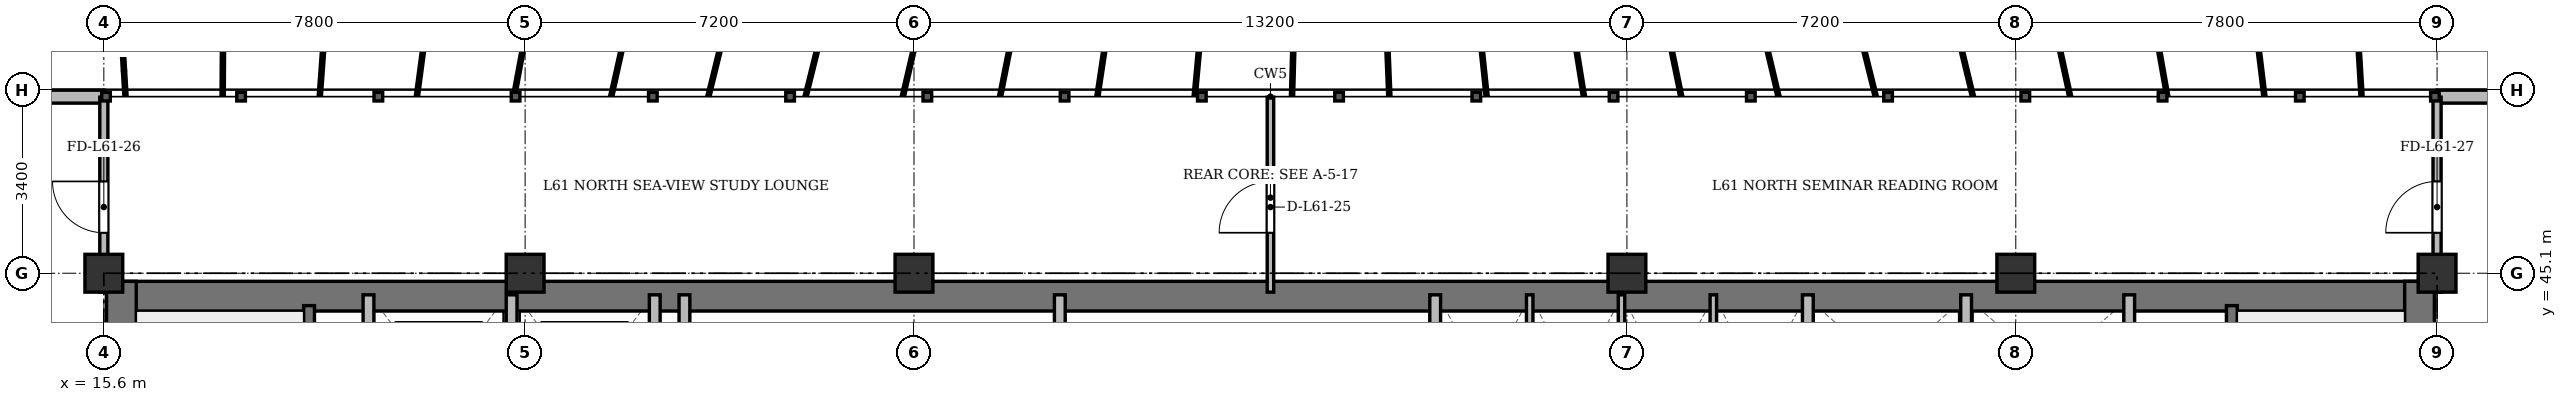
"""IFC4 building model, lengths in metres.
Left out: names, types, materials, properties, quantities, classifications, styles, units other than length and angle.
Written with IfcOpenShell. Run it as: python <this file> out.ifc"""

import sys

from ifc_helpers import new_model, si_unit, direction, frame, frame_2d, origin, origin_2d, place, context, subcontext, project, spatial, rectangle, extrude, source, transform, mapped, element, fill, save


model = new_model("IFC4")
c1 = context("Model", 3, precision=1e-05, world=origin(), true_north=direction((0.0, 1.0)))
c2 = subcontext(c1, "Body", "Model", "MODEL_VIEW")
j1 = project(units=[si_unit("LENGTHUNIT", "METRE"), si_unit("PLANEANGLEUNIT", "RADIAN")], contexts=[c1])
p1 = place(None, origin())
s1 = spatial("IfcSite", under=j1, at=p1, CompositionType="ELEMENT")
p2 = place(p1, origin())
s2 = spatial("IfcBuilding", under=s1, at=p2, CompositionType="ELEMENT")
p3 = place(p2, frame((0.0, 0.0, 233.7)))
s3 = spatial("IfcBuildingStorey", under=s2, at=p3, CompositionType="ELEMENT", Elevation=233.7)
m1 = source(origin(), c2, "Body", "SweptSolid", [
    extrude(rectangle(XDim=0.7, YDim=0.7, at=origin_2d()), origin(), (0.0, 0.0, 1.0), 3.6),
])
for number, where, z_axis, x_axis in (
    (1, (15.6, 45.1, 0.0), (0.0, 0.0, 1.0), (1.0, 0.0, 0.0)),
    (2, (23.4, 45.1, 0.0), (0.0, 0.0, 1.0), (1.0, 0.0, 0.0)),
    (3, (30.6, 45.1, 0.0), (0.0, 0.0, 1.0), (1.0, 0.0, 0.0)),
    (4, (43.8, 45.1, 0.0), (0.0, 0.0, 1.0), (1.0, 0.0, 0.0)),
    (5, (51.0, 45.1, 0.0), (0.0, 0.0, 1.0), (1.0, 0.0, 0.0)),
    (6, (58.8, 45.1, 0.0), (0.0, 0.0, 1.0), (1.0, 0.0, 0.0)),
):
    element("IfcColumn", number, at=place(p3, frame(where, z_axis=z_axis, x_axis=x_axis)), inside=s3, PredefinedType="COLUMN", context=c2, shape_type="MappedRepresentation", body=[
        mapped(m1, transform((0.0, 0.0, 0.0), x_axis=(1.0, 0.0, 0.0), y_axis=(0.0, 1.0, 0.0), z_axis=(0.0, 0.0, 1.0), scale=1.0)),
    ])
p4 = place(p3, frame((11.1, 48.37, 0.0), z_axis=(0.0, 0.0, 1.0), x_axis=(1.0, 0.0, 0.0)))
e7 = element("IfcWall", 7, at=p4, inside=s3, PredefinedType="SOLIDWALL", context=c2, shape_type="SweptSolid", body=[
    extrude(rectangle(XDim=4.5, YDim=0.24, at=frame_2d((2.25, 0.0))), origin(), (0.0, 0.0, 1.0), 3.36),
])
p5 = place(p4, frame((1.667, 0.0, 0.9)))
e8 = element("IfcOpeningElement", 8, at=p5, cuts=e7, PredefinedType="OPENING", context=c2, shape_type="SweptSolid", body=[
    extrude(rectangle(XDim=1.35, YDim=1.5, at=frame_2d((0.675, 0.75))), frame((0.0, 0.13, 0.0), z_axis=(0.0, -1.0, 0.0), x_axis=(1.0, 0.0, 0.0)), (0.0, 0.0, 1.0), 0.26),
])
p6 = place(p3, frame((58.8, 48.37, 0.0), z_axis=(0.0, 0.0, 1.0), x_axis=(1.0, 0.0, 0.0)))
e9 = element("IfcWall", 9, at=p6, inside=s3, PredefinedType="SOLIDWALL", context=c2, shape_type="SweptSolid", body=[
    extrude(rectangle(XDim=4.5, YDim=0.24, at=frame_2d((2.25, 0.0))), origin(), (0.0, 0.0, 1.0), 3.36),
])
p7 = place(p6, frame((1.483, 0.0, 0.9)))
e10 = element("IfcOpeningElement", 10, at=p7, cuts=e9, PredefinedType="OPENING", context=c2, shape_type="SweptSolid", body=[
    extrude(rectangle(XDim=1.35, YDim=1.5, at=frame_2d((0.675, 0.75))), frame((0.0, 0.13, 0.0), z_axis=(0.0, -1.0, 0.0), x_axis=(1.0, 0.0, 0.0)), (0.0, 0.0, 1.0), 0.26),
])
p8 = place(p3, frame((15.65, 44.675, 0.0), z_axis=(0.0, 0.0, 1.0), x_axis=(1.0, 0.0, 0.0)))
e11 = element("IfcWall", 11, at=p8, inside=s3, PredefinedType="SHEAR", context=c2, shape_type="SweptSolid", body=[
    extrude(rectangle(XDim=43.1, YDim=0.55, at=frame_2d((21.55, 0.0))), origin(), (0.0, 0.0, 1.0), 3.36),
])
for number, where, z_axis, x_axis in (
    (12, (15.925, 33.4, 0.0), (0.0, 0.0, 1.0), (0.0, 1.0, 0.0)),
    (13, (58.475, 33.4, 0.0), (0.0, 0.0, 1.0), (0.0, 1.0, 0.0)),
):
    element("IfcWall", number, at=place(p3, frame(where, z_axis=z_axis, x_axis=x_axis)), inside=s3, PredefinedType="SHEAR", context=c2, shape_type="SweptSolid", body=[
        extrude(rectangle(XDim=11.55, YDim=0.55, at=frame_2d((5.775, 0.0))), origin(), (0.0, 0.0, 1.0), 3.36),
    ])
p9 = place(p3, frame((19.4, 33.4, 0.0), z_axis=(0.0, 0.0, 1.0), x_axis=(0.0, 1.0, 0.0)))
e14 = element("IfcWall", 14, at=p9, inside=s3, PredefinedType="SHEAR", context=c2, shape_type="SweptSolid", body=[
    extrude(rectangle(XDim=11.1, YDim=0.2, at=frame_2d((5.55, 0.0))), origin(), (0.0, 0.0, 1.0), 3.36),
])
p10 = place(p9, frame((0.85, 0.0, 0.0)))
e15 = element("IfcOpeningElement", 15, at=p10, cuts=e14, PredefinedType="OPENING", context=c2, shape_type="SweptSolid", body=[
    extrude(rectangle(XDim=1.1, YDim=2.15, at=frame_2d((0.55, 1.075))), frame((0.0, 0.11, 0.0), z_axis=(0.0, -1.0, 0.0), x_axis=(1.0, 0.0, 0.0)), (0.0, 0.0, 1.0), 0.22),
])
p11 = place(p3, frame((55.0, 33.4, 0.0), z_axis=(0.0, 0.0, 1.0), x_axis=(0.0, 1.0, 0.0)))
e16 = element("IfcWall", 16, at=p11, inside=s3, PredefinedType="SHEAR", context=c2, shape_type="SweptSolid", body=[
    extrude(rectangle(XDim=11.1, YDim=0.2, at=frame_2d((5.55, 0.0))), origin(), (0.0, 0.0, 1.0), 3.36),
])
p12 = place(p11, frame((0.85, 0.0, 0.0)))
e17 = element("IfcOpeningElement", 17, at=p12, cuts=e16, PredefinedType="OPENING", context=c2, shape_type="SweptSolid", body=[
    extrude(rectangle(XDim=1.1, YDim=2.15, at=frame_2d((0.55, 1.075))), frame((0.0, 0.11, 0.0), z_axis=(0.0, -1.0, 0.0), x_axis=(1.0, 0.0, 0.0)), (0.0, 0.0, 1.0), 0.22),
])
for number, where, z_axis, x_axis in (
    (18, (20.5, 41.3, 0.0), (0.0, 0.0, 1.0), (0.0, 1.0, 0.0)),
    (19, (23.15, 41.3, 0.0), (0.0, 0.0, 1.0), (0.0, 1.0, 0.0)),
    (20, (25.8, 41.3, 0.0), (0.0, 0.0, 1.0), (0.0, 1.0, 0.0)),
):
    element("IfcWall", number, at=place(p3, frame(where, z_axis=z_axis, x_axis=x_axis)), inside=s3, PredefinedType="SOLIDWALL", context=c2, shape_type="SweptSolid", body=[
        extrude(rectangle(XDim=3.4, YDim=0.2, at=frame_2d((1.7, 0.0))), origin(), (0.0, 0.0, 1.0), 3.36),
    ])
for number, where, z_axis, x_axis in (
    (21, (26.35, 33.4, 0.0), (0.0, 0.0, 1.0), (0.0, 1.0, 0.0)),
    (22, (33.3, 33.4, 0.0), (0.0, 0.0, 1.0), (0.0, 1.0, 0.0)),
):
    element("IfcWall", number, at=place(p3, frame(where, z_axis=z_axis, x_axis=x_axis)), inside=s3, PredefinedType="SOLIDWALL", context=c2, shape_type="SweptSolid", body=[
        extrude(rectangle(XDim=11.3, YDim=0.2, at=frame_2d((5.65, 0.0))), origin(), (0.0, 0.0, 1.0), 2.91),
    ])
p13 = place(p3, frame((40.25, 41.5, 0.0), z_axis=(0.0, 0.0, 1.0), x_axis=(0.0, 1.0, 0.0)))
e23 = element("IfcWall", 23, at=p13, inside=s3, PredefinedType="SOLIDWALL", context=c2, shape_type="SweptSolid", body=[
    extrude(rectangle(XDim=3.2, YDim=0.2, at=frame_2d((1.6, 0.0))), origin(), (0.0, 0.0, 1.0), 3.36),
])
for number, where, z_axis, x_axis in (
    (24, (42.0, 41.5, 0.0), (0.0, 0.0, 1.0), (0.0, 1.0, 0.0)),
    (25, (43.7, 41.5, 0.0), (0.0, 0.0, 1.0), (0.0, 1.0, 0.0)),
    (26, (45.4, 41.5, 0.0), (0.0, 0.0, 1.0), (0.0, 1.0, 0.0)),
):
    element("IfcWall", number, at=place(p3, frame(where, z_axis=z_axis, x_axis=x_axis)), inside=s3, PredefinedType="PARTITIONING", context=c2, shape_type="SweptSolid", body=[
        extrude(rectangle(XDim=3.2, YDim=0.12, at=frame_2d((1.6, 0.0))), origin(), (0.0, 0.0, 1.0), 3.36),
    ])
p14 = place(p3, frame((47.15, 33.4, 0.0), z_axis=(0.0, 0.0, 1.0), x_axis=(0.0, 1.0, 0.0)))
e27 = element("IfcWall", 27, at=p14, inside=s3, PredefinedType="SOLIDWALL", context=c2, shape_type="SweptSolid", body=[
    extrude(rectangle(XDim=11.3, YDim=0.2, at=frame_2d((5.65, 0.0))), origin(), (0.0, 0.0, 1.0), 2.91),
])
for number, where, z_axis, x_axis in (
    (28, (50.08, 42.05, 0.0), (0.0, 0.0, 1.0), (0.0, 1.0, 0.0)),
    (29, (53.1, 42.05, 0.0), (0.0, 0.0, 1.0), (0.0, 1.0, 0.0)),
):
    element("IfcWall", number, at=place(p3, frame(where, z_axis=z_axis, x_axis=x_axis)), inside=s3, PredefinedType="SOLIDWALL", context=c2, shape_type="SweptSolid", body=[
        extrude(rectangle(XDim=2.65, YDim=0.2, at=frame_2d((1.325, 0.0))), origin(), (0.0, 0.0, 1.0), 3.36),
    ])
p15 = place(p3, frame((37.2, 44.75, 0.0), z_axis=(0.0, 0.0, 1.0), x_axis=(0.0, 1.0, 0.0)))
e30 = element("IfcWall", 30, at=p15, inside=s3, PredefinedType="PARTITIONING", context=c2, shape_type="SweptSolid", body=[
    extrude(rectangle(XDim=3.61, YDim=0.12, at=frame_2d((1.805, 0.0))), origin(), (0.0, 0.0, 1.0), 2.91),
])
p16 = place(p15, frame((1.1, 0.0, 0.0)))
e31 = element("IfcOpeningElement", 31, at=p16, cuts=e30, PredefinedType="OPENING", context=c2, shape_type="SweptSolid", body=[
    extrude(rectangle(XDim=0.95, YDim=2.15, at=frame_2d((0.475, 1.075))), frame((0.0, 0.07, 0.0), z_axis=(0.0, -1.0, 0.0), x_axis=(1.0, 0.0, 0.0)), (0.0, 0.0, 1.0), 0.14),
])
p17 = place(p3, frame((15.6, 44.75, 0.0), z_axis=(0.0, 0.0, 1.0), x_axis=(0.0, 1.0, 0.0)))
e32 = element("IfcWall", 32, at=p17, inside=s3, PredefinedType="PARTITIONING", context=c2, shape_type="SweptSolid", body=[
    extrude(rectangle(XDim=3.61, YDim=0.15, at=frame_2d((1.805, 0.0))), origin(), (0.0, 0.0, 1.0), 2.86),
])
p18 = place(p17, frame((1.1, 0.0, 0.0)))
e33 = element("IfcOpeningElement", 33, at=p18, cuts=e32, PredefinedType="OPENING", context=c2, shape_type="SweptSolid", body=[
    extrude(rectangle(XDim=0.95, YDim=2.15, at=frame_2d((0.475, 1.075))), frame((0.0, 0.085, 0.0), z_axis=(0.0, -1.0, 0.0), x_axis=(1.0, 0.0, 0.0)), (0.0, 0.0, 1.0), 0.17),
])
p19 = place(p3, frame((58.8, 44.75, 0.0), z_axis=(0.0, 0.0, 1.0), x_axis=(0.0, 1.0, 0.0)))
e34 = element("IfcWall", 34, at=p19, inside=s3, PredefinedType="PARTITIONING", context=c2, shape_type="SweptSolid", body=[
    extrude(rectangle(XDim=3.61, YDim=0.15, at=frame_2d((1.805, 0.0))), origin(), (0.0, 0.0, 1.0), 2.86),
])
p20 = place(p19, frame((1.1, 0.0, 0.0)))
e35 = element("IfcOpeningElement", 35, at=p20, cuts=e34, PredefinedType="OPENING", context=c2, shape_type="SweptSolid", body=[
    extrude(rectangle(XDim=0.95, YDim=2.15, at=frame_2d((0.475, 1.075))), frame((0.0, 0.085, 0.0), z_axis=(0.0, -1.0, 0.0), x_axis=(1.0, 0.0, 0.0)), (0.0, 0.0, 1.0), 0.17),
])
m2 = source(origin(), c2, "Body", "SweptSolid", [
    extrude(rectangle(XDim=0.95, YDim=2.15, at=frame_2d((0.475, 1.075))), frame((0.0, 0.025, 0.0), z_axis=(0.0, -1.0, 0.0), x_axis=(1.0, 0.0, 0.0)), (0.0, 0.0, 1.0), 0.05),
])
p21 = place(p16, origin())
e36 = element("IfcDoor", 36, at=p21, inside=s3, OperationType="SINGLE_SWING_LEFT", PredefinedType="DOOR", context=c2, shape_type="MappedRepresentation", body=[
    mapped(m2, transform((0.0, 0.0, 0.0), x_axis=(1.0, 0.0, 0.0), y_axis=(0.0, 1.0, 0.0), z_axis=(0.0, 0.0, 1.0), scale=1.0)),
])
fill(e31, e36)
p22 = place(p18, origin())
e37 = element("IfcDoor", 37, at=p22, inside=s3, OperationType="SINGLE_SWING_RIGHT", PredefinedType="DOOR", context=c2, shape_type="MappedRepresentation", body=[
    mapped(m2, transform((0.0, 0.0, 0.0), x_axis=(1.0, 0.0, 0.0), y_axis=(0.0, 1.0, 0.0), z_axis=(0.0, 0.0, 1.0), scale=1.0)),
])
fill(e33, e37)
p23 = place(p20, origin())
e38 = element("IfcDoor", 38, at=p23, inside=s3, OperationType="SINGLE_SWING_LEFT", PredefinedType="DOOR", context=c2, shape_type="MappedRepresentation", body=[
    mapped(m2, transform((0.0, 0.0, 0.0), x_axis=(1.0, 0.0, 0.0), y_axis=(0.0, 1.0, 0.0), z_axis=(0.0, 0.0, 1.0), scale=1.0)),
])
fill(e35, e38)
save(model, sys.argv[1])
